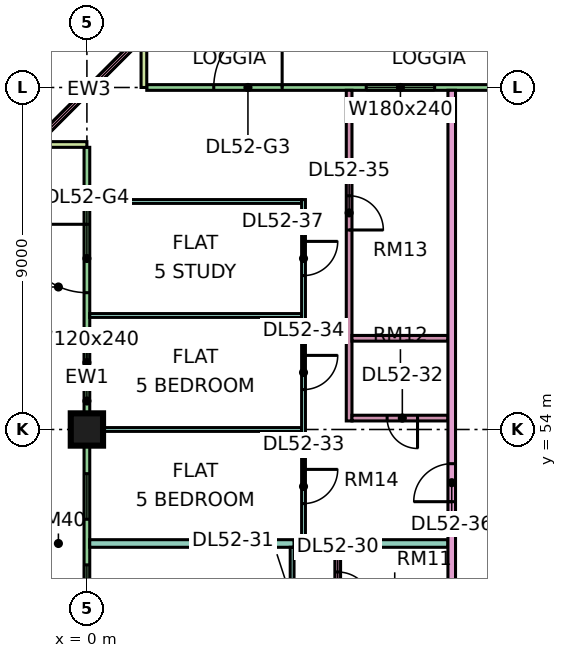
"""IFC4 building model, lengths in metres.
Left out: names, types, materials, properties, quantities, classifications, styles, units other than length and angle.
Written with IfcOpenShell. Run it as: python <this file> out.ifc"""

import sys

from ifc_helpers import new_model, si_unit, direction, frame, frame_2d, origin, origin_2d, place, context, subcontext, project, spatial, rectangle, extrude, element, fill, save


model = new_model("IFC4")
c1 = context("Model", 3, precision=1e-05, world=origin(), true_north=direction((0.0, 1.0)))
c2 = subcontext(c1, "Body", "Model", "MODEL_VIEW")
j1 = project(units=[si_unit("LENGTHUNIT", "METRE"), si_unit("PLANEANGLEUNIT", "RADIAN")], contexts=[c1])
p1 = place(None, origin())
s1 = spatial("IfcSite", under=j1, at=p1, CompositionType="ELEMENT")
p2 = place(p1, origin())
s2 = spatial("IfcBuilding", under=s1, at=p2, CompositionType="ELEMENT")
p3 = place(p2, frame((0.0, 0.0, 222.9)))
s3 = spatial("IfcBuildingStorey", under=s2, at=p3, CompositionType="ELEMENT", Elevation=222.9)
p4 = place(p3, frame((0.0, 54.0, 0.0), z_axis=(0.0, 0.0, 1.0), x_axis=(1.0, 0.0, 0.0)))
e1 = element("IfcColumn", 1, at=p4, inside=s3, PredefinedType="COLUMN", context=c2, shape_type="SweptSolid", body=[
    extrude(rectangle(XDim=0.85, YDim=0.85, at=origin_2d()), origin(), (0.0, 0.0, 1.0), 3.75),
])
p5 = place(p3, frame((11.925, 63.0, 0.0), z_axis=(0.0, 0.0, 1.0), x_axis=(-1.0, 0.0, 0.0)))
e2 = element("IfcWall", 2, at=p5, inside=s3, PredefinedType="SOLIDWALL", context=c2, shape_type="SweptSolid", body=[
    extrude(rectangle(XDim=10.35, YDim=0.15, at=frame_2d((5.175, 0.0))), origin(), (0.0, 0.0, 1.0), 3.35),
])
p6 = place(p5, frame((2.775, 0.0, 0.45)))
e3 = element("IfcOpeningElement", 3, at=p6, cuts=e2, PredefinedType="OPENING", context=c2, shape_type="SweptSolid", body=[
    extrude(rectangle(XDim=1.8, YDim=2.4, at=frame_2d((0.9, 1.2))), frame((0.0, 0.085, 0.0), z_axis=(0.0, -1.0, 0.0), x_axis=(1.0, 0.0, 0.0)), (0.0, 0.0, 1.0), 0.17),
])
p7 = place(p5, frame((6.788, 0.0, 0.0)))
e4 = element("IfcOpeningElement", 4, at=p7, cuts=e2, PredefinedType="OPENING", context=c2, shape_type="SweptSolid", body=[
    extrude(rectangle(XDim=1.8, YDim=2.4, at=frame_2d((0.9, 1.2))), frame((0.0, 0.085, 0.0), z_axis=(0.0, -1.0, 0.0), x_axis=(1.0, 0.0, 0.0)), (0.0, 0.0, 1.0), 0.17),
])
p8 = place(p3, frame((1.5, 64.5, 0.0), z_axis=(0.0, 0.0, 1.0), x_axis=(0.0, -1.0, 0.0)))
e5 = element("IfcWall", 5, at=p8, inside=s3, PredefinedType="SOLIDWALL", context=c2, shape_type="SweptSolid", body=[
    extrude(rectangle(XDim=1.5, YDim=0.15, at=frame_2d((0.75, 0.0))), origin(), (0.0, 0.0, 1.0), 3.35),
])
p9 = place(p3, frame((1.553, 64.447, 0.0), z_axis=(0.0, 0.0, 1.0), x_axis=(-0.707106781187, -0.707106781187, 0.0)))
e6 = element("IfcWall", 6, at=p9, inside=s3, PredefinedType="SOLIDWALL", context=c2, shape_type="SweptSolid", body=[
    extrude(rectangle(XDim=4.243, YDim=0.15, at=frame_2d((2.121, 0.0))), origin(), (0.0, 0.0, 1.0), 3.35),
])
p10 = place(p9, frame((0.621, 0.0, 0.45)))
e7 = element("IfcOpeningElement", 7, at=p10, cuts=e6, PredefinedType="OPENING", context=c2, shape_type="SweptSolid", body=[
    extrude(rectangle(XDim=3.0, YDim=2.4, at=frame_2d((1.5, 1.2))), frame((0.0, 0.085, 0.0), z_axis=(0.0, -1.0, 0.0), x_axis=(1.0, 0.0, 0.0)), (0.0, 0.0, 1.0), 0.17),
])
p11 = place(p3, frame((0.0, 61.425, 0.0), z_axis=(0.0, 0.0, 1.0), x_axis=(0.0, -1.0, 0.0)))
e8 = element("IfcWall", 8, at=p11, inside=s3, PredefinedType="SOLIDWALL", context=c2, shape_type="SweptSolid", body=[
    extrude(rectangle(XDim=13.35, YDim=0.15, at=frame_2d((6.675, 0.0))), origin(), (0.0, 0.0, 1.0), 3.35),
])
p12 = place(p11, frame((2.025, 0.0, 0.0)))
e9 = element("IfcOpeningElement", 9, at=p12, cuts=e8, PredefinedType="OPENING", context=c2, shape_type="SweptSolid", body=[
    extrude(rectangle(XDim=1.8, YDim=2.4, at=frame_2d((0.9, 1.2))), frame((0.0, 0.085, 0.0), z_axis=(0.0, -1.0, 0.0), x_axis=(1.0, 0.0, 0.0)), (0.0, 0.0, 1.0), 0.17),
])
p13 = place(p11, frame((5.062, 0.0, 0.45)))
e10 = element("IfcOpeningElement", 10, at=p13, cuts=e8, PredefinedType="OPENING", context=c2, shape_type="SweptSolid", body=[
    extrude(rectangle(XDim=1.2, YDim=2.4, at=frame_2d((0.6, 1.2))), frame((0.0, 0.085, 0.0), z_axis=(0.0, -1.0, 0.0), x_axis=(1.0, 0.0, 0.0)), (0.0, 0.0, 1.0), 0.17),
])
p14 = place(p11, frame((8.587, 0.0, 0.45)))
e11 = element("IfcOpeningElement", 11, at=p14, cuts=e8, PredefinedType="OPENING", context=c2, shape_type="SweptSolid", body=[
    extrude(rectangle(XDim=1.2, YDim=2.4, at=frame_2d((0.6, 1.2))), frame((0.0, 0.085, 0.0), z_axis=(0.0, -1.0, 0.0), x_axis=(1.0, 0.0, 0.0)), (0.0, 0.0, 1.0), 0.17),
])
p15 = place(p11, frame((10.988, 0.0, 0.45)))
e12 = element("IfcOpeningElement", 12, at=p15, cuts=e8, PredefinedType="OPENING", context=c2, shape_type="SweptSolid", body=[
    extrude(rectangle(XDim=1.8, YDim=2.4, at=frame_2d((0.9, 1.2))), frame((0.0, 0.085, 0.0), z_axis=(0.0, -1.0, 0.0), x_axis=(1.0, 0.0, 0.0)), (0.0, 0.0, 1.0), 0.17),
])
p16 = place(p3, frame((-1.5, 61.5, 0.0), z_axis=(0.0, 0.0, 1.0), x_axis=(1.0, 0.0, 0.0)))
e13 = element("IfcWall", 13, at=p16, inside=s3, PredefinedType="SOLIDWALL", context=c2, shape_type="SweptSolid", body=[
    extrude(rectangle(XDim=1.5, YDim=0.15, at=frame_2d((0.75, 0.0))), origin(), (0.0, 0.0, 1.0), 3.35),
])
p17 = place(p3, frame((0.074, 51.0, 0.0), z_axis=(0.0, 0.0, 1.0), x_axis=(1.0, 0.0, 0.0)))
e14 = element("IfcWall", 14, at=p17, inside=s3, PredefinedType="PARTITIONING", context=c2, shape_type="SweptSolid", body=[
    extrude(rectangle(XDim=5.376, YDim=0.2, at=frame_2d((2.688, 0.0))), origin(), (0.0, 0.0, 1.0), 3.35),
])
for number, where, z_axis, x_axis in (
    (15, (0.074, 54.0, 0.0), (0.0, 0.0, 1.0), (1.0, 0.0, 0.0)),
    (16, (0.074, 57.0, 0.0), (0.0, 0.0, 1.0), (1.0, 0.0, 0.0)),
    (17, (0.074, 60.0, 0.0), (0.0, 0.0, 1.0), (1.0, 0.0, 0.0)),
):
    element("IfcWall", number, at=place(p3, frame(where, z_axis=z_axis, x_axis=x_axis)), inside=s3, PredefinedType="PARTITIONING", context=c2, shape_type="SweptSolid", body=[
        extrude(rectangle(XDim=5.576, YDim=0.1, at=frame_2d((2.788, 0.0))), origin(), (0.0, 0.0, 1.0), 3.35),
    ])
p18 = place(p3, frame((5.4, 48.05, 0.0), z_axis=(0.0, 0.0, 1.0), x_axis=(0.0, 1.0, 0.0)))
e18 = element("IfcWall", 18, at=p18, inside=s3, PredefinedType="PARTITIONING", context=c2, shape_type="SweptSolid", body=[
    extrude(rectangle(XDim=2.85, YDim=0.1, at=frame_2d((1.425, 0.0))), origin(), (0.0, 0.0, 1.0), 3.35),
])
p19 = place(p18, frame((1.0, 0.0, 0.0)))
e19 = element("IfcOpeningElement", 19, at=p19, cuts=e18, PredefinedType="OPENING", context=c2, shape_type="SweptSolid", body=[
    extrude(rectangle(XDim=0.9, YDim=2.1, at=frame_2d((0.45, 1.05))), frame((0.0, 0.06, 0.0), z_axis=(0.0, -1.0, 0.0), x_axis=(1.0, 0.0, 0.0)), (0.0, 0.0, 1.0), 0.12),
])
p20 = place(p3, frame((5.65, 51.0, 0.0), z_axis=(0.0, 0.0, 1.0), x_axis=(1.0, 0.0, 0.0)))
e20 = element("IfcWall", 20, at=p20, inside=s3, PredefinedType="PARTITIONING", context=c2, shape_type="SweptSolid", body=[
    extrude(rectangle(XDim=3.85, YDim=0.2, at=frame_2d((1.925, 0.0))), origin(), (0.0, 0.0, 1.0), 3.35),
])
p21 = place(p3, frame((5.7, 51.1, 0.0), z_axis=(0.0, 0.0, 1.0), x_axis=(0.0, 1.0, 0.0)))
e21 = element("IfcWall", 21, at=p21, inside=s3, PredefinedType="PARTITIONING", context=c2, shape_type="SweptSolid", body=[
    extrude(rectangle(XDim=8.95, YDim=0.1, at=frame_2d((4.475, 0.0))), origin(), (0.0, 0.0, 1.0), 3.35),
])
p22 = place(p21, frame((0.95, 0.0, 0.0)))
e22 = element("IfcOpeningElement", 22, at=p22, cuts=e21, PredefinedType="OPENING", context=c2, shape_type="SweptSolid", body=[
    extrude(rectangle(XDim=0.9, YDim=2.1, at=frame_2d((0.45, 1.05))), frame((0.0, 0.06, 0.0), z_axis=(0.0, -1.0, 0.0), x_axis=(1.0, 0.0, 0.0)), (0.0, 0.0, 1.0), 0.12),
])
p23 = place(p21, frame((3.95, 0.0, 0.0)))
e23 = element("IfcOpeningElement", 23, at=p23, cuts=e21, PredefinedType="OPENING", context=c2, shape_type="SweptSolid", body=[
    extrude(rectangle(XDim=0.9, YDim=2.1, at=frame_2d((0.45, 1.05))), frame((0.0, 0.06, 0.0), z_axis=(0.0, -1.0, 0.0), x_axis=(1.0, 0.0, 0.0)), (0.0, 0.0, 1.0), 0.12),
])
p24 = place(p21, frame((6.95, 0.0, 0.0)))
e24 = element("IfcOpeningElement", 24, at=p24, cuts=e21, PredefinedType="OPENING", context=c2, shape_type="SweptSolid", body=[
    extrude(rectangle(XDim=0.9, YDim=2.1, at=frame_2d((0.45, 1.05))), frame((0.0, 0.06, 0.0), z_axis=(0.0, -1.0, 0.0), x_axis=(1.0, 0.0, 0.0)), (0.0, 0.0, 1.0), 0.12),
])
p25 = place(p3, frame((6.6, 39.25, 0.0), z_axis=(0.0, 0.0, 1.0), x_axis=(0.0, 1.0, 0.0)))
e25 = element("IfcWall", 25, at=p25, inside=s3, PredefinedType="PARTITIONING", context=c2, shape_type="SweptSolid", body=[
    extrude(rectangle(XDim=11.65, YDim=0.15, at=frame_2d((5.825, 0.0))), origin(), (0.0, 0.0, 1.0), 3.35),
])
p26 = place(p25, frame((3.5, 0.0, 0.0)))
e26 = element("IfcOpeningElement", 26, at=p26, cuts=e25, PredefinedType="OPENING", context=c2, shape_type="SweptSolid", body=[
    extrude(rectangle(XDim=0.8, YDim=2.1, at=frame_2d((0.4, 1.05))), frame((0.0, 0.085, 0.0), z_axis=(0.0, -1.0, 0.0), x_axis=(1.0, 0.0, 0.0)), (0.0, 0.0, 1.0), 0.17),
])
p27 = place(p25, frame((7.1, 0.0, 0.0)))
e27 = element("IfcOpeningElement", 27, at=p27, cuts=e25, PredefinedType="OPENING", context=c2, shape_type="SweptSolid", body=[
    extrude(rectangle(XDim=0.9, YDim=2.1, at=frame_2d((0.45, 1.05))), frame((0.0, 0.085, 0.0), z_axis=(0.0, -1.0, 0.0), x_axis=(1.0, 0.0, 0.0)), (0.0, 0.0, 1.0), 0.17),
])
p28 = place(p25, frame((10.1, 0.0, 0.0)))
e28 = element("IfcOpeningElement", 28, at=p28, cuts=e25, PredefinedType="OPENING", context=c2, shape_type="SweptSolid", body=[
    extrude(rectangle(XDim=0.9, YDim=2.1, at=frame_2d((0.45, 1.05))), frame((0.0, 0.085, 0.0), z_axis=(0.0, -1.0, 0.0), x_axis=(1.0, 0.0, 0.0)), (0.0, 0.0, 1.0), 0.17),
])
p29 = place(p3, frame((6.9, 54.225, 0.0), z_axis=(0.0, 0.0, 1.0), x_axis=(0.0, 1.0, 0.0)))
e29 = element("IfcWall", 29, at=p29, inside=s3, PredefinedType="PARTITIONING", context=c2, shape_type="SweptSolid", body=[
    extrude(rectangle(XDim=8.701, YDim=0.15, at=frame_2d((4.351, 0.0))), origin(), (0.0, 0.0, 1.0), 3.35),
])
p30 = place(p29, frame((5.025, 0.0, 0.0)))
e30 = element("IfcOpeningElement", 30, at=p30, cuts=e29, PredefinedType="OPENING", context=c2, shape_type="SweptSolid", body=[
    extrude(rectangle(XDim=0.9, YDim=2.1, at=frame_2d((0.45, 1.05))), frame((0.0, 0.085, 0.0), z_axis=(0.0, -1.0, 0.0), x_axis=(1.0, 0.0, 0.0)), (0.0, 0.0, 1.0), 0.17),
])
p31 = place(p3, frame((6.975, 54.3, 0.0), z_axis=(0.0, 0.0, 1.0), x_axis=(1.0, 0.0, 0.0)))
e31 = element("IfcWall", 31, at=p31, inside=s3, PredefinedType="PARTITIONING", context=c2, shape_type="SweptSolid", body=[
    extrude(rectangle(XDim=2.525, YDim=0.15, at=frame_2d((1.262, 0.0))), origin(), (0.0, 0.0, 1.0), 3.35),
])
p32 = place(p31, frame((0.925, 0.0, 0.0)))
e32 = element("IfcOpeningElement", 32, at=p32, cuts=e31, PredefinedType="OPENING", context=c2, shape_type="SweptSolid", body=[
    extrude(rectangle(XDim=0.8, YDim=2.1, at=frame_2d((0.4, 1.05))), frame((0.0, 0.085, 0.0), z_axis=(0.0, -1.0, 0.0), x_axis=(1.0, 0.0, 0.0)), (0.0, 0.0, 1.0), 0.17),
])
p33 = place(p3, frame((6.975, 56.4, 0.0), z_axis=(0.0, 0.0, 1.0), x_axis=(1.0, 0.0, 0.0)))
e33 = element("IfcWall", 33, at=p33, inside=s3, PredefinedType="PARTITIONING", context=c2, shape_type="SweptSolid", body=[
    extrude(rectangle(XDim=2.525, YDim=0.15, at=frame_2d((1.262, 0.0))), origin(), (0.0, 0.0, 1.0), 3.35),
])
p34 = place(p3, frame((9.6, 20.0, 0.0), z_axis=(0.0, 0.0, 1.0), x_axis=(0.0, 1.0, 0.0)))
e34 = element("IfcWall", 34, at=p34, inside=s3, PredefinedType="PARTITIONING", context=c2, shape_type="SweptSolid", body=[
    extrude(rectangle(XDim=42.926, YDim=0.2, at=frame_2d((21.463, 0.0))), origin(), (0.0, 0.0, 1.0), 3.35),
])
p35 = place(p34, frame((17.1, 0.0, 0.0)))
e35 = element("IfcOpeningElement", 35, at=p35, cuts=e34, PredefinedType="OPENING", context=c2, shape_type="SweptSolid", body=[
    extrude(rectangle(XDim=1.0, YDim=2.1, at=frame_2d((0.5, 1.05))), frame((0.0, 0.11, 0.0), z_axis=(0.0, -1.0, 0.0), x_axis=(1.0, 0.0, 0.0)), (0.0, 0.0, 1.0), 0.22),
])
p36 = place(p34, frame((32.1, 0.0, 0.0)))
e36 = element("IfcOpeningElement", 36, at=p36, cuts=e34, PredefinedType="OPENING", context=c2, shape_type="SweptSolid", body=[
    extrude(rectangle(XDim=1.0, YDim=2.1, at=frame_2d((0.5, 1.05))), frame((0.0, 0.11, 0.0), z_axis=(0.0, -1.0, 0.0), x_axis=(1.0, 0.0, 0.0)), (0.0, 0.0, 1.0), 0.22),
])
p37 = place(p34, frame((0.6, 0.0, 0.0)))
e37 = element("IfcOpeningElement", 37, at=p37, cuts=e34, PredefinedType="OPENING", context=c2, shape_type="SweptSolid", body=[
    extrude(rectangle(XDim=1.2, YDim=2.1, at=frame_2d((0.6, 1.05))), frame((0.0, 0.11, 0.0), z_axis=(0.0, -1.0, 0.0), x_axis=(1.0, 0.0, 0.0)), (0.0, 0.0, 1.0), 0.22),
])
p38 = place(p34, frame((14.1, 0.0, 0.0)))
e38 = element("IfcOpeningElement", 38, at=p38, cuts=e34, PredefinedType="OPENING", context=c2, shape_type="SweptSolid", body=[
    extrude(rectangle(XDim=1.0, YDim=2.1, at=frame_2d((0.5, 1.05))), frame((0.0, 0.11, 0.0), z_axis=(0.0, -1.0, 0.0), x_axis=(1.0, 0.0, 0.0)), (0.0, 0.0, 1.0), 0.22),
])
p39 = place(p6, origin())
e39 = element("IfcWindow", 39, at=p39, inside=s3, PartitioningType="SINGLE_PANEL", PredefinedType="WINDOW", context=c2, shape_type="SweptSolid", body=[
    extrude(rectangle(XDim=1.8, YDim=2.4, at=frame_2d((0.9, 1.2))), frame((0.0, 0.03, 0.0), z_axis=(0.0, -1.0, 0.0), x_axis=(1.0, 0.0, 0.0)), (0.0, 0.0, 1.0), 0.06),
])
fill(e3, e39)
p40 = place(p7, frame((1.8, 0.0, 0.0), z_axis=(0.0, 0.0, 1.0), x_axis=(-1.0, 0.0, 0.0)))
e40 = element("IfcDoor", 40, at=p40, inside=s3, OperationType="DOUBLE_DOOR_SINGLE_SWING", PredefinedType="DOOR", context=c2, shape_type="SweptSolid", body=[
    extrude(rectangle(XDim=1.8, YDim=2.4, at=frame_2d((0.9, 1.2))), frame((0.0, 0.025, 0.0), z_axis=(0.0, -1.0, 0.0), x_axis=(1.0, 0.0, 0.0)), (0.0, 0.0, 1.0), 0.05),
])
fill(e4, e40)
p41 = place(p10, origin())
e41 = element("IfcWindow", 41, at=p41, inside=s3, PartitioningType="SINGLE_PANEL", PredefinedType="WINDOW", context=c2, shape_type="SweptSolid", body=[
    extrude(rectangle(XDim=3.0, YDim=2.4, at=frame_2d((1.5, 1.2))), frame((0.0, 0.03, 0.0), z_axis=(0.0, -1.0, 0.0), x_axis=(1.0, 0.0, 0.0)), (0.0, 0.0, 1.0), 0.06),
])
fill(e7, e41)
p42 = place(p12, frame((1.8, 0.0, 0.0), z_axis=(0.0, 0.0, 1.0), x_axis=(-1.0, 0.0, 0.0)))
e42 = element("IfcDoor", 42, at=p42, inside=s3, OperationType="DOUBLE_DOOR_SINGLE_SWING", PredefinedType="DOOR", context=c2, shape_type="SweptSolid", body=[
    extrude(rectangle(XDim=1.8, YDim=2.4, at=frame_2d((0.9, 1.2))), frame((0.0, 0.025, 0.0), z_axis=(0.0, -1.0, 0.0), x_axis=(1.0, 0.0, 0.0)), (0.0, 0.0, 1.0), 0.05),
])
fill(e9, e42)
p43 = place(p13, origin())
e43 = element("IfcWindow", 43, at=p43, inside=s3, PartitioningType="SINGLE_PANEL", PredefinedType="WINDOW", context=c2, shape_type="SweptSolid", body=[
    extrude(rectangle(XDim=1.2, YDim=2.4, at=frame_2d((0.6, 1.2))), frame((0.0, 0.03, 0.0), z_axis=(0.0, -1.0, 0.0), x_axis=(1.0, 0.0, 0.0)), (0.0, 0.0, 1.0), 0.06),
])
fill(e10, e43)
p44 = place(p14, origin())
e44 = element("IfcWindow", 44, at=p44, inside=s3, PartitioningType="SINGLE_PANEL", PredefinedType="WINDOW", context=c2, shape_type="SweptSolid", body=[
    extrude(rectangle(XDim=1.2, YDim=2.4, at=frame_2d((0.6, 1.2))), frame((0.0, 0.03, 0.0), z_axis=(0.0, -1.0, 0.0), x_axis=(1.0, 0.0, 0.0)), (0.0, 0.0, 1.0), 0.06),
])
fill(e11, e44)
p45 = place(p15, origin())
e45 = element("IfcWindow", 45, at=p45, inside=s3, PartitioningType="SINGLE_PANEL", PredefinedType="WINDOW", context=c2, shape_type="SweptSolid", body=[
    extrude(rectangle(XDim=1.8, YDim=2.4, at=frame_2d((0.9, 1.2))), frame((0.0, 0.03, 0.0), z_axis=(0.0, -1.0, 0.0), x_axis=(1.0, 0.0, 0.0)), (0.0, 0.0, 1.0), 0.06),
])
fill(e12, e45)
p46 = place(p28, frame((0.9, 0.0, 0.0), z_axis=(0.0, 0.0, 1.0), x_axis=(-1.0, 0.0, 0.0)))
e46 = element("IfcDoor", 46, at=p46, inside=s3, OperationType="SINGLE_SWING_LEFT", PredefinedType="DOOR", context=c2, shape_type="SweptSolid", body=[
    extrude(rectangle(XDim=0.9, YDim=2.1, at=frame_2d((0.45, 1.05))), frame((0.0, 0.025, 0.0), z_axis=(0.0, -1.0, 0.0), x_axis=(1.0, 0.0, 0.0)), (0.0, 0.0, 1.0), 0.05),
])
fill(e28, e46)
p47 = place(p32, origin())
e47 = element("IfcDoor", 47, at=p47, inside=s3, OperationType="SINGLE_SWING_RIGHT", PredefinedType="DOOR", context=c2, shape_type="SweptSolid", body=[
    extrude(rectangle(XDim=0.8, YDim=2.1, at=frame_2d((0.4, 1.05))), frame((0.0, 0.025, 0.0), z_axis=(0.0, -1.0, 0.0), x_axis=(1.0, 0.0, 0.0)), (0.0, 0.0, 1.0), 0.05),
])
fill(e32, e47)
p48 = place(p22, origin())
e48 = element("IfcDoor", 48, at=p48, inside=s3, OperationType="SINGLE_SWING_RIGHT", PredefinedType="DOOR", context=c2, shape_type="SweptSolid", body=[
    extrude(rectangle(XDim=0.9, YDim=2.1, at=frame_2d((0.45, 1.05))), frame((0.0, 0.025, 0.0), z_axis=(0.0, -1.0, 0.0), x_axis=(1.0, 0.0, 0.0)), (0.0, 0.0, 1.0), 0.05),
])
fill(e22, e48)
p49 = place(p23, origin())
e49 = element("IfcDoor", 49, at=p49, inside=s3, OperationType="SINGLE_SWING_RIGHT", PredefinedType="DOOR", context=c2, shape_type="SweptSolid", body=[
    extrude(rectangle(XDim=0.9, YDim=2.1, at=frame_2d((0.45, 1.05))), frame((0.0, 0.025, 0.0), z_axis=(0.0, -1.0, 0.0), x_axis=(1.0, 0.0, 0.0)), (0.0, 0.0, 1.0), 0.05),
])
fill(e23, e49)
p50 = place(p30, frame((0.9, 0.0, 0.0), z_axis=(0.0, 0.0, 1.0), x_axis=(-1.0, 0.0, 0.0)))
e50 = element("IfcDoor", 50, at=p50, inside=s3, OperationType="SINGLE_SWING_LEFT", PredefinedType="DOOR", context=c2, shape_type="SweptSolid", body=[
    extrude(rectangle(XDim=0.9, YDim=2.1, at=frame_2d((0.45, 1.05))), frame((0.0, 0.025, 0.0), z_axis=(0.0, -1.0, 0.0), x_axis=(1.0, 0.0, 0.0)), (0.0, 0.0, 1.0), 0.05),
])
fill(e30, e50)
p51 = place(p36, origin())
e51 = element("IfcDoor", 51, at=p51, inside=s3, OperationType="SINGLE_SWING_LEFT", PredefinedType="DOOR", context=c2, shape_type="SweptSolid", body=[
    extrude(rectangle(XDim=1.0, YDim=2.1, at=frame_2d((0.5, 1.05))), frame((0.0, 0.025, 0.0), z_axis=(0.0, -1.0, 0.0), x_axis=(1.0, 0.0, 0.0)), (0.0, 0.0, 1.0), 0.05),
])
fill(e36, e51)
p52 = place(p24, origin())
e52 = element("IfcDoor", 52, at=p52, inside=s3, OperationType="SINGLE_SWING_RIGHT", PredefinedType="DOOR", context=c2, shape_type="SweptSolid", body=[
    extrude(rectangle(XDim=0.9, YDim=2.1, at=frame_2d((0.45, 1.05))), frame((0.0, 0.025, 0.0), z_axis=(0.0, -1.0, 0.0), x_axis=(1.0, 0.0, 0.0)), (0.0, 0.0, 1.0), 0.05),
])
fill(e24, e52)
save(model, sys.argv[1])
